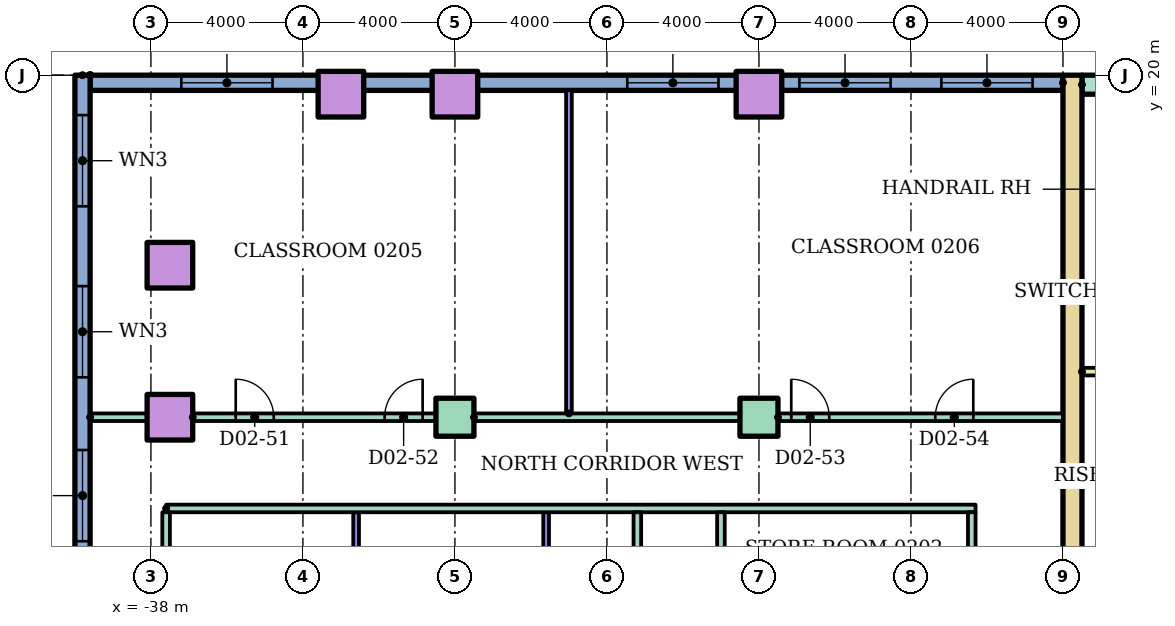
"""IFC4 building model, lengths in metres.
Left out: names, types, materials, properties, quantities, classifications, styles, units other than length and angle.
Written with IfcOpenShell. Run it as: python <this file> out.ifc"""

import sys

from ifc_helpers import new_model, si_unit, direction, frame, frame_2d, origin, origin_2d, place, context, subcontext, project, spatial, rectangle, hollow_rectangle, extrude, element, fill, save


model = new_model("IFC4")
c1 = context("Model", 3, precision=1e-05, world=origin(), true_north=direction((0.0, 1.0)))
c2 = subcontext(c1, "Body", "Model", "MODEL_VIEW")
j1 = project(units=[si_unit("LENGTHUNIT", "METRE"), si_unit("PLANEANGLEUNIT", "RADIAN")], contexts=[c1])
p1 = place(None, origin())
s1 = spatial("IfcSite", under=j1, at=p1, CompositionType="ELEMENT")
p2 = place(p1, origin())
s2 = spatial("IfcBuilding", under=s1, at=p2, CompositionType="ELEMENT")
p3 = place(p2, frame((0.0, 0.0, 10.0)))
s3 = spatial("IfcBuildingStorey", under=s2, at=p3, CompositionType="ELEMENT", Elevation=10.0)
p4 = place(p3, frame((-37.5, 11.0, 0.0)))
e1 = element("IfcColumn", 1, at=p4, inside=s3, PredefinedType="COLUMN", context=c2, shape_type="SweptSolid", body=[
    extrude(hollow_rectangle(XDim=1.2, YDim=1.2, WallThickness=0.06, at=origin_2d()), origin(), (0.0, 0.0, 1.0), 4.0),
])
for number, where in (
    (2, (-30.0, 11.0, 0.0)),
    (3, (-22.0, 11.0, 0.0)),
):
    element("IfcColumn", number, at=place(p3, frame(where)), inside=s3, PredefinedType="COLUMN", context=c2, shape_type="SweptSolid", body=[
        extrude(rectangle(XDim=1.0, YDim=1.0, at=origin_2d()), origin(), (0.0, 0.0, 1.0), 4.0),
    ])
for number, where in (
    (4, (-37.5, 15.0, 0.0)),
    (5, (-33.0, 19.5, 0.0)),
    (6, (-30.0, 19.5, 0.0)),
    (7, (-22.0, 19.5, 0.0)),
):
    element("IfcColumn", number, at=place(p3, frame(where)), inside=s3, PredefinedType="COLUMN", context=c2, shape_type="SweptSolid", body=[
        extrude(hollow_rectangle(XDim=1.2, YDim=1.2, WallThickness=0.06, at=origin_2d()), origin(), (0.0, 0.0, 1.0), 4.0),
    ])
p5 = place(p3, frame((-14.0, 19.8, 0.0), z_axis=(0.0, 0.0, 1.0), x_axis=(-1.0, 0.0, 0.0)))
e8 = element("IfcWall", 8, at=p5, inside=s3, PredefinedType="STANDARD", context=c2, shape_type="SweptSolid", body=[
    extrude(rectangle(XDim=25.6, YDim=0.4, at=frame_2d((12.8, 0.0))), origin(), (0.0, 0.0, 1.0), 3.7),
])
p6 = place(p5, frame((0.8, 0.0, 0.9)))
e9 = element("IfcOpeningElement", 9, at=p6, cuts=e8, PredefinedType="OPENING", context=c2, shape_type="SweptSolid", body=[
    extrude(rectangle(XDim=2.4, YDim=2.1, at=frame_2d((1.2, 1.05))), frame((0.0, 0.21, 0.0), z_axis=(0.0, -1.0, 0.0), x_axis=(1.0, 0.0, 0.0)), (0.0, 0.0, 1.0), 0.42),
])
p7 = place(p5, frame((4.535, 0.0, 0.9)))
e10 = element("IfcOpeningElement", 10, at=p7, cuts=e8, PredefinedType="OPENING", context=c2, shape_type="SweptSolid", body=[
    extrude(rectangle(XDim=2.4, YDim=2.1, at=frame_2d((1.2, 1.05))), frame((0.0, 0.21, 0.0), z_axis=(0.0, -1.0, 0.0), x_axis=(1.0, 0.0, 0.0)), (0.0, 0.0, 1.0), 0.42),
])
p8 = place(p5, frame((9.065, 0.0, 0.9)))
e11 = element("IfcOpeningElement", 11, at=p8, cuts=e8, PredefinedType="OPENING", context=c2, shape_type="SweptSolid", body=[
    extrude(rectangle(XDim=2.4, YDim=2.1, at=frame_2d((1.2, 1.05))), frame((0.0, 0.21, 0.0), z_axis=(0.0, -1.0, 0.0), x_axis=(1.0, 0.0, 0.0)), (0.0, 0.0, 1.0), 0.42),
])
p9 = place(p5, frame((20.8, 0.0, 0.9)))
e12 = element("IfcOpeningElement", 12, at=p9, cuts=e8, PredefinedType="OPENING", context=c2, shape_type="SweptSolid", body=[
    extrude(rectangle(XDim=2.4, YDim=2.1, at=frame_2d((1.2, 1.05))), frame((0.0, 0.21, 0.0), z_axis=(0.0, -1.0, 0.0), x_axis=(1.0, 0.0, 0.0)), (0.0, 0.0, 1.0), 0.42),
])
p10 = place(p3, frame((-39.8, 20.0, 0.0), z_axis=(0.0, 0.0, 1.0), x_axis=(0.0, -1.0, 0.0)))
e13 = element("IfcWall", 13, at=p10, inside=s3, PredefinedType="STANDARD", context=c2, shape_type="SweptSolid", body=[
    extrude(rectangle(XDim=70.0, YDim=0.4, at=frame_2d((35.0, 0.0))), origin(), (0.0, 0.0, 1.0), 3.7),
])
p11 = place(p10, frame((1.05, 0.0, 0.9)))
e14 = element("IfcOpeningElement", 14, at=p11, cuts=e13, PredefinedType="OPENING", context=c2, shape_type="SweptSolid", body=[
    extrude(rectangle(XDim=2.4, YDim=2.1, at=frame_2d((1.2, 1.05))), frame((0.0, 0.21, 0.0), z_axis=(0.0, -1.0, 0.0), x_axis=(1.0, 0.0, 0.0)), (0.0, 0.0, 1.0), 0.42),
])
p12 = place(p10, frame((5.55, 0.0, 0.9)))
e15 = element("IfcOpeningElement", 15, at=p12, cuts=e13, PredefinedType="OPENING", context=c2, shape_type="SweptSolid", body=[
    extrude(rectangle(XDim=2.4, YDim=2.1, at=frame_2d((1.2, 1.05))), frame((0.0, 0.21, 0.0), z_axis=(0.0, -1.0, 0.0), x_axis=(1.0, 0.0, 0.0)), (0.0, 0.0, 1.0), 0.42),
])
p13 = place(p10, frame((9.863, 0.0, 0.9)))
e16 = element("IfcOpeningElement", 16, at=p13, cuts=e13, PredefinedType="OPENING", context=c2, shape_type="SweptSolid", body=[
    extrude(rectangle(XDim=2.4, YDim=2.1, at=frame_2d((1.2, 1.05))), frame((0.0, 0.21, 0.0), z_axis=(0.0, -1.0, 0.0), x_axis=(1.0, 0.0, 0.0)), (0.0, 0.0, 1.0), 0.42),
])
p14 = place(p10, frame((13.988, 0.0, 0.9)))
e17 = element("IfcOpeningElement", 17, at=p14, cuts=e13, PredefinedType="OPENING", context=c2, shape_type="SweptSolid", body=[
    extrude(rectangle(XDim=2.4, YDim=2.1, at=frame_2d((1.2, 1.05))), frame((0.0, 0.21, 0.0), z_axis=(0.0, -1.0, 0.0), x_axis=(1.0, 0.0, 0.0)), (0.0, 0.0, 1.0), 0.42),
])
p15 = place(p10, frame((18.113, 0.0, 0.9)))
e18 = element("IfcOpeningElement", 18, at=p15, cuts=e13, PredefinedType="OPENING", context=c2, shape_type="SweptSolid", body=[
    extrude(rectangle(XDim=2.4, YDim=2.1, at=frame_2d((1.2, 1.05))), frame((0.0, 0.21, 0.0), z_axis=(0.0, -1.0, 0.0), x_axis=(1.0, 0.0, 0.0)), (0.0, 0.0, 1.0), 0.42),
])
p16 = place(p10, frame((22.238, 0.0, 0.9)))
e19 = element("IfcOpeningElement", 19, at=p16, cuts=e13, PredefinedType="OPENING", context=c2, shape_type="SweptSolid", body=[
    extrude(rectangle(XDim=2.4, YDim=2.1, at=frame_2d((1.2, 1.05))), frame((0.0, 0.21, 0.0), z_axis=(0.0, -1.0, 0.0), x_axis=(1.0, 0.0, 0.0)), (0.0, 0.0, 1.0), 0.42),
])
p17 = place(p10, frame((26.363, 0.0, 0.9)))
e20 = element("IfcOpeningElement", 20, at=p17, cuts=e13, PredefinedType="OPENING", context=c2, shape_type="SweptSolid", body=[
    extrude(rectangle(XDim=2.4, YDim=2.1, at=frame_2d((1.2, 1.05))), frame((0.0, 0.21, 0.0), z_axis=(0.0, -1.0, 0.0), x_axis=(1.0, 0.0, 0.0)), (0.0, 0.0, 1.0), 0.42),
])
p18 = place(p10, frame((30.488, 0.0, 0.9)))
e21 = element("IfcOpeningElement", 21, at=p18, cuts=e13, PredefinedType="OPENING", context=c2, shape_type="SweptSolid", body=[
    extrude(rectangle(XDim=2.4, YDim=2.1, at=frame_2d((1.2, 1.05))), frame((0.0, 0.21, 0.0), z_axis=(0.0, -1.0, 0.0), x_axis=(1.0, 0.0, 0.0)), (0.0, 0.0, 1.0), 0.42),
])
p19 = place(p10, frame((34.613, 0.0, 0.9)))
e22 = element("IfcOpeningElement", 22, at=p19, cuts=e13, PredefinedType="OPENING", context=c2, shape_type="SweptSolid", body=[
    extrude(rectangle(XDim=2.4, YDim=2.1, at=frame_2d((1.2, 1.05))), frame((0.0, 0.21, 0.0), z_axis=(0.0, -1.0, 0.0), x_axis=(1.0, 0.0, 0.0)), (0.0, 0.0, 1.0), 0.42),
])
p20 = place(p10, frame((38.738, 0.0, 0.9)))
e23 = element("IfcOpeningElement", 23, at=p20, cuts=e13, PredefinedType="OPENING", context=c2, shape_type="SweptSolid", body=[
    extrude(rectangle(XDim=2.4, YDim=2.1, at=frame_2d((1.2, 1.05))), frame((0.0, 0.21, 0.0), z_axis=(0.0, -1.0, 0.0), x_axis=(1.0, 0.0, 0.0)), (0.0, 0.0, 1.0), 0.42),
])
p21 = place(p10, frame((42.633, 0.0, 0.9)))
e24 = element("IfcOpeningElement", 24, at=p21, cuts=e13, PredefinedType="OPENING", context=c2, shape_type="SweptSolid", body=[
    extrude(rectangle(XDim=2.4, YDim=2.1, at=frame_2d((1.2, 1.05))), frame((0.0, 0.21, 0.0), z_axis=(0.0, -1.0, 0.0), x_axis=(1.0, 0.0, 0.0)), (0.0, 0.0, 1.0), 0.42),
])
p22 = place(p10, frame((46.3, 0.0, 0.9)))
e25 = element("IfcOpeningElement", 25, at=p22, cuts=e13, PredefinedType="OPENING", context=c2, shape_type="SweptSolid", body=[
    extrude(rectangle(XDim=2.4, YDim=2.1, at=frame_2d((1.2, 1.05))), frame((0.0, 0.21, 0.0), z_axis=(0.0, -1.0, 0.0), x_axis=(1.0, 0.0, 0.0)), (0.0, 0.0, 1.0), 0.42),
])
p23 = place(p10, frame((49.967, 0.0, 0.9)))
e26 = element("IfcOpeningElement", 26, at=p23, cuts=e13, PredefinedType="OPENING", context=c2, shape_type="SweptSolid", body=[
    extrude(rectangle(XDim=2.4, YDim=2.1, at=frame_2d((1.2, 1.05))), frame((0.0, 0.21, 0.0), z_axis=(0.0, -1.0, 0.0), x_axis=(1.0, 0.0, 0.0)), (0.0, 0.0, 1.0), 0.42),
])
p24 = place(p10, frame((66.85, 0.0, 0.9)))
e27 = element("IfcOpeningElement", 27, at=p24, cuts=e13, PredefinedType="OPENING", context=c2, shape_type="SweptSolid", body=[
    extrude(rectangle(XDim=2.4, YDim=2.1, at=frame_2d((1.2, 1.05))), frame((0.0, 0.21, 0.0), z_axis=(0.0, -1.0, 0.0), x_axis=(1.0, 0.0, 0.0)), (0.0, 0.0, 1.0), 0.42),
])
p25 = place(p3, frame((-13.75, 3.0, 0.0), z_axis=(0.0, 0.0, 1.0), x_axis=(0.0, 1.0, 0.0)))
e28 = element("IfcWall", 28, at=p25, inside=s3, PredefinedType="SHEAR", context=c2, shape_type="SweptSolid", body=[
    extrude(rectangle(XDim=17.0, YDim=0.5, at=frame_2d((8.5, 0.0))), origin(), (0.0, 0.0, 1.0), 3.7),
])
p26 = place(p3, frame((-13.5, 19.75, 0.0)))
e29 = element("IfcWall", 29, at=p26, inside=s3, PredefinedType="SHEAR", context=c2, shape_type="SweptSolid", body=[
    extrude(rectangle(XDim=27.0, YDim=0.5, at=frame_2d((13.5, 0.0))), origin(), (0.0, 0.0, 1.0), 3.7),
])
p27 = place(p3, frame((-13.5, 12.2, 0.0)))
e30 = element("IfcWall", 30, at=p27, inside=s3, PredefinedType="PARTITIONING", context=c2, shape_type="SweptSolid", body=[
    extrude(rectangle(XDim=3.9, YDim=0.2, at=frame_2d((1.95, 0.0))), origin(), (0.0, 0.0, 1.0), 3.7),
])
p28 = place(p3, frame((-37.6, 8.6, 0.0)))
e31 = element("IfcWall", 31, at=p28, inside=s3, PredefinedType="PARTITIONING", context=c2, shape_type="SweptSolid", body=[
    extrude(rectangle(XDim=21.3, YDim=0.2, at=frame_2d((10.65, 0.0))), origin(), (0.0, 0.0, 1.0), 3.7),
])
p29 = place(p3, frame((-39.6, 11.0, 0.0)))
e32 = element("IfcWall", 32, at=p29, inside=s3, PredefinedType="PARTITIONING", context=c2, shape_type="SweptSolid", body=[
    extrude(rectangle(XDim=1.5, YDim=0.2, at=frame_2d((0.75, 0.0))), origin(), (0.0, 0.0, 1.0), 3.7),
])
p30 = place(p3, frame((-36.9, 11.0, 0.0)))
e33 = element("IfcWall", 33, at=p30, inside=s3, PredefinedType="PARTITIONING", context=c2, shape_type="SweptSolid", body=[
    extrude(rectangle(XDim=6.4, YDim=0.2, at=frame_2d((3.2, 0.0))), origin(), (0.0, 0.0, 1.0), 3.7),
])
p31 = place(p30, frame((1.132, 0.0, 0.0)))
e34 = element("IfcOpeningElement", 34, at=p31, cuts=e33, PredefinedType="OPENING", context=c2, shape_type="SweptSolid", body=[
    extrude(rectangle(XDim=1.0, YDim=2.1, at=frame_2d((0.5, 1.05))), frame((0.0, 0.11, 0.0), z_axis=(0.0, -1.0, 0.0), x_axis=(1.0, 0.0, 0.0)), (0.0, 0.0, 1.0), 0.22),
])
p32 = place(p30, frame((5.05, 0.0, 0.0)))
e35 = element("IfcOpeningElement", 35, at=p32, cuts=e33, PredefinedType="OPENING", context=c2, shape_type="SweptSolid", body=[
    extrude(rectangle(XDim=1.0, YDim=2.1, at=frame_2d((0.5, 1.05))), frame((0.0, 0.11, 0.0), z_axis=(0.0, -1.0, 0.0), x_axis=(1.0, 0.0, 0.0)), (0.0, 0.0, 1.0), 0.22),
])
p33 = place(p3, frame((-29.5, 11.0, 0.0)))
e36 = element("IfcWall", 36, at=p33, inside=s3, PredefinedType="PARTITIONING", context=c2, shape_type="SweptSolid", body=[
    extrude(rectangle(XDim=7.0, YDim=0.2, at=frame_2d((3.5, 0.0))), origin(), (0.0, 0.0, 1.0), 3.7),
])
p34 = place(p3, frame((-21.5, 11.0, 0.0)))
e37 = element("IfcWall", 37, at=p34, inside=s3, PredefinedType="PARTITIONING", context=c2, shape_type="SweptSolid", body=[
    extrude(rectangle(XDim=7.5, YDim=0.2, at=frame_2d((3.75, 0.0))), origin(), (0.0, 0.0, 1.0), 3.7),
])
p35 = place(p34, frame((0.35, 0.0, 0.0)))
e38 = element("IfcOpeningElement", 38, at=p35, cuts=e37, PredefinedType="OPENING", context=c2, shape_type="SweptSolid", body=[
    extrude(rectangle(XDim=1.0, YDim=2.1, at=frame_2d((0.5, 1.05))), frame((0.0, 0.11, 0.0), z_axis=(0.0, -1.0, 0.0), x_axis=(1.0, 0.0, 0.0)), (0.0, 0.0, 1.0), 0.22),
])
p36 = place(p34, frame((4.14, 0.0, 0.0)))
e39 = element("IfcOpeningElement", 39, at=p36, cuts=e37, PredefinedType="OPENING", context=c2, shape_type="SweptSolid", body=[
    extrude(rectangle(XDim=1.0, YDim=2.1, at=frame_2d((0.5, 1.05))), frame((0.0, 0.11, 0.0), z_axis=(0.0, -1.0, 0.0), x_axis=(1.0, 0.0, 0.0)), (0.0, 0.0, 1.0), 0.22),
])
p37 = place(p3, frame((-37.6, 2.6, 0.0), z_axis=(0.0, 0.0, 1.0), x_axis=(0.0, 1.0, 0.0)))
e40 = element("IfcWall", 40, at=p37, inside=s3, PredefinedType="PARTITIONING", context=c2, shape_type="SweptSolid", body=[
    extrude(rectangle(XDim=5.9, YDim=0.2, at=frame_2d((2.95, 0.0))), origin(), (0.0, 0.0, 1.0), 3.7),
])
for number, where, z_axis, x_axis in (
    (41, (-32.6, 1.5, 0.0), (0.0, 0.0, 1.0), (0.0, 1.0, 0.0)),
    (42, (-27.6, 1.5, 0.0), (0.0, 0.0, 1.0), (0.0, 1.0, 0.0)),
):
    element("IfcWall", number, at=place(p3, frame(where, z_axis=z_axis, x_axis=x_axis)), inside=s3, PredefinedType="PARTITIONING", context=c2, shape_type="SweptSolid", body=[
        extrude(rectangle(XDim=7.0, YDim=0.15, at=frame_2d((3.5, 0.0))), origin(), (0.0, 0.0, 1.0), 3.7),
    ])
p38 = place(p3, frame((-27.0, 11.1, 0.0), z_axis=(0.0, 0.0, 1.0), x_axis=(0.0, 1.0, 0.0)))
e43 = element("IfcWall", 43, at=p38, inside=s3, PredefinedType="PARTITIONING", context=c2, shape_type="SweptSolid", body=[
    extrude(rectangle(XDim=8.5, YDim=0.15, at=frame_2d((4.25, 0.0))), origin(), (0.0, 0.0, 1.0), 3.7),
])
for number, where, z_axis, x_axis in (
    (44, (-25.2, 1.5, 0.0), (0.0, 0.0, 1.0), (0.0, 1.0, 0.0)),
    (45, (-23.0, 1.5, 0.0), (0.0, 0.0, 1.0), (0.0, 1.0, 0.0)),
):
    element("IfcWall", number, at=place(p3, frame(where, z_axis=z_axis, x_axis=x_axis)), inside=s3, PredefinedType="PARTITIONING", context=c2, shape_type="SweptSolid", body=[
        extrude(rectangle(XDim=7.0, YDim=0.2, at=frame_2d((3.5, 0.0))), origin(), (0.0, 0.0, 1.0), 3.7),
    ])
p39 = place(p3, frame((-16.4, 1.5, 0.0), z_axis=(0.0, 0.0, 1.0), x_axis=(0.0, 1.0, 0.0)))
e46 = element("IfcWall", 46, at=p39, inside=s3, PredefinedType="PARTITIONING", context=c2, shape_type="SweptSolid", body=[
    extrude(rectangle(XDim=7.0, YDim=0.2, at=frame_2d((3.5, 0.0))), origin(), (0.0, 0.0, 1.0), 3.7),
])
p40 = place(p39, frame((3.05, 0.0, 0.0)))
e47 = element("IfcOpeningElement", 47, at=p40, cuts=e46, PredefinedType="OPENING", context=c2, shape_type="SweptSolid", body=[
    extrude(rectangle(XDim=0.9, YDim=2.1, at=frame_2d((0.45, 1.05))), frame((0.0, 0.11, 0.0), z_axis=(0.0, -1.0, 0.0), x_axis=(1.0, 0.0, 0.0)), (0.0, 0.0, 1.0), 0.22),
])
p41 = place(p6, origin())
e48 = element("IfcWindow", 48, at=p41, inside=s3, PartitioningType="SINGLE_PANEL", PredefinedType="WINDOW", context=c2, shape_type="SweptSolid", body=[
    extrude(rectangle(XDim=2.4, YDim=2.1, at=frame_2d((1.2, 1.05))), frame((0.0, 0.03, 0.0), z_axis=(0.0, -1.0, 0.0), x_axis=(1.0, 0.0, 0.0)), (0.0, 0.0, 1.0), 0.06),
])
fill(e9, e48)
p42 = place(p7, origin())
e49 = element("IfcWindow", 49, at=p42, inside=s3, PartitioningType="SINGLE_PANEL", PredefinedType="WINDOW", context=c2, shape_type="SweptSolid", body=[
    extrude(rectangle(XDim=2.4, YDim=2.1, at=frame_2d((1.2, 1.05))), frame((0.0, 0.03, 0.0), z_axis=(0.0, -1.0, 0.0), x_axis=(1.0, 0.0, 0.0)), (0.0, 0.0, 1.0), 0.06),
])
fill(e10, e49)
p43 = place(p8, origin())
e50 = element("IfcWindow", 50, at=p43, inside=s3, PartitioningType="SINGLE_PANEL", PredefinedType="WINDOW", context=c2, shape_type="SweptSolid", body=[
    extrude(rectangle(XDim=2.4, YDim=2.1, at=frame_2d((1.2, 1.05))), frame((0.0, 0.03, 0.0), z_axis=(0.0, -1.0, 0.0), x_axis=(1.0, 0.0, 0.0)), (0.0, 0.0, 1.0), 0.06),
])
fill(e11, e50)
p44 = place(p9, origin())
e51 = element("IfcWindow", 51, at=p44, inside=s3, PartitioningType="SINGLE_PANEL", PredefinedType="WINDOW", context=c2, shape_type="SweptSolid", body=[
    extrude(rectangle(XDim=2.4, YDim=2.1, at=frame_2d((1.2, 1.05))), frame((0.0, 0.03, 0.0), z_axis=(0.0, -1.0, 0.0), x_axis=(1.0, 0.0, 0.0)), (0.0, 0.0, 1.0), 0.06),
])
fill(e12, e51)
p45 = place(p11, origin())
e52 = element("IfcWindow", 52, at=p45, inside=s3, PartitioningType="SINGLE_PANEL", PredefinedType="WINDOW", context=c2, shape_type="SweptSolid", body=[
    extrude(rectangle(XDim=2.4, YDim=2.1, at=frame_2d((1.2, 1.05))), frame((0.0, 0.03, 0.0), z_axis=(0.0, -1.0, 0.0), x_axis=(1.0, 0.0, 0.0)), (0.0, 0.0, 1.0), 0.06),
])
fill(e14, e52)
p46 = place(p12, origin())
e53 = element("IfcWindow", 53, at=p46, inside=s3, PartitioningType="SINGLE_PANEL", PredefinedType="WINDOW", context=c2, shape_type="SweptSolid", body=[
    extrude(rectangle(XDim=2.4, YDim=2.1, at=frame_2d((1.2, 1.05))), frame((0.0, 0.03, 0.0), z_axis=(0.0, -1.0, 0.0), x_axis=(1.0, 0.0, 0.0)), (0.0, 0.0, 1.0), 0.06),
])
fill(e15, e53)
p47 = place(p13, origin())
e54 = element("IfcWindow", 54, at=p47, inside=s3, PartitioningType="SINGLE_PANEL", PredefinedType="WINDOW", context=c2, shape_type="SweptSolid", body=[
    extrude(rectangle(XDim=2.4, YDim=2.1, at=frame_2d((1.2, 1.05))), frame((0.0, 0.03, 0.0), z_axis=(0.0, -1.0, 0.0), x_axis=(1.0, 0.0, 0.0)), (0.0, 0.0, 1.0), 0.06),
])
fill(e16, e54)
p48 = place(p31, origin())
e55 = element("IfcDoor", 55, at=p48, inside=s3, OperationType="SINGLE_SWING_LEFT", PredefinedType="DOOR", context=c2, shape_type="SweptSolid", body=[
    extrude(rectangle(XDim=1.0, YDim=2.1, at=frame_2d((0.5, 1.05))), frame((0.0, 0.025, 0.0), z_axis=(0.0, -1.0, 0.0), x_axis=(1.0, 0.0, 0.0)), (0.0, 0.0, 1.0), 0.05),
])
fill(e34, e55)
p49 = place(p32, origin())
e56 = element("IfcDoor", 56, at=p49, inside=s3, OperationType="SINGLE_SWING_RIGHT", PredefinedType="DOOR", context=c2, shape_type="SweptSolid", body=[
    extrude(rectangle(XDim=1.0, YDim=2.1, at=frame_2d((0.5, 1.05))), frame((0.0, 0.025, 0.0), z_axis=(0.0, -1.0, 0.0), x_axis=(1.0, 0.0, 0.0)), (0.0, 0.0, 1.0), 0.05),
])
fill(e35, e56)
p50 = place(p35, origin())
e57 = element("IfcDoor", 57, at=p50, inside=s3, OperationType="SINGLE_SWING_LEFT", PredefinedType="DOOR", context=c2, shape_type="SweptSolid", body=[
    extrude(rectangle(XDim=1.0, YDim=2.1, at=frame_2d((0.5, 1.05))), frame((0.0, 0.025, 0.0), z_axis=(0.0, -1.0, 0.0), x_axis=(1.0, 0.0, 0.0)), (0.0, 0.0, 1.0), 0.05),
])
fill(e38, e57)
p51 = place(p36, origin())
e58 = element("IfcDoor", 58, at=p51, inside=s3, OperationType="SINGLE_SWING_RIGHT", PredefinedType="DOOR", context=c2, shape_type="SweptSolid", body=[
    extrude(rectangle(XDim=1.0, YDim=2.1, at=frame_2d((0.5, 1.05))), frame((0.0, 0.025, 0.0), z_axis=(0.0, -1.0, 0.0), x_axis=(1.0, 0.0, 0.0)), (0.0, 0.0, 1.0), 0.05),
])
fill(e39, e58)
save(model, sys.argv[1])
